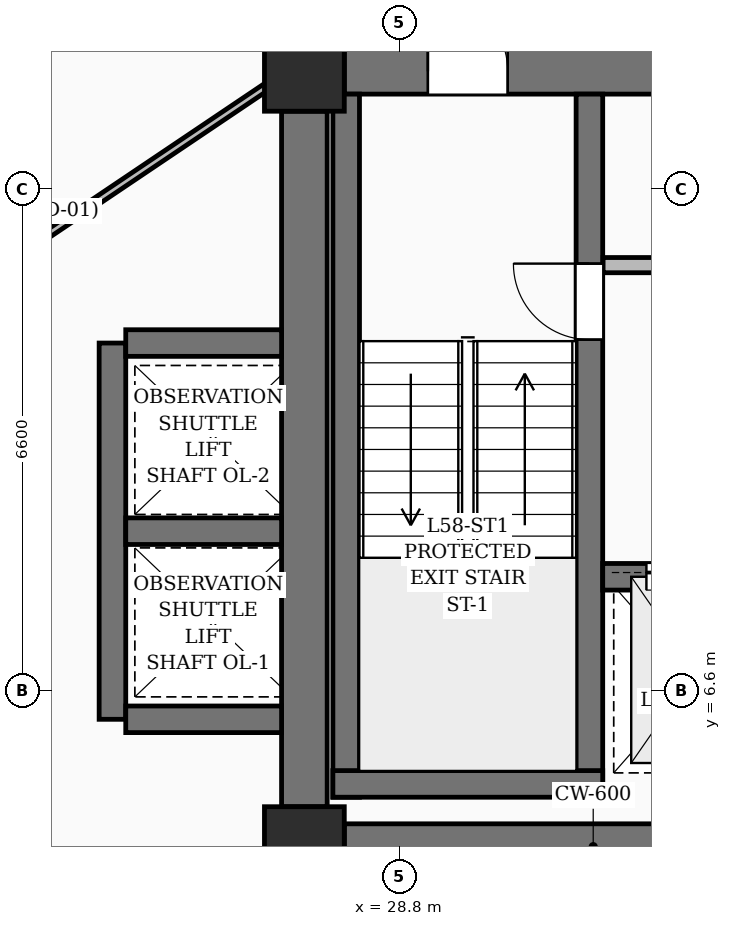
"""IFC4 building model, lengths in metres.
Left out: names, types, materials, properties, quantities, classifications, styles, units other than length and angle.
Written with IfcOpenShell. Run it as: python <this file> out.ifc"""

import sys

from ifc_helpers import new_model, si_unit, direction, frame, frame_2d, origin, origin_2d, place, context, subcontext, project, spatial, rectangle, extrude, element, fill, save


model = new_model("IFC4")
c1 = context("Model", 3, precision=1e-05, world=origin(), true_north=direction((0.0, 1.0)))
c2 = subcontext(c1, "Body", "Model", "MODEL_VIEW")
j1 = project(units=[si_unit("LENGTHUNIT", "METRE"), si_unit("PLANEANGLEUNIT", "RADIAN")], contexts=[c1])
p1 = place(None, origin())
s1 = spatial("IfcSite", under=j1, at=p1, CompositionType="ELEMENT")
p2 = place(p1, origin())
s2 = spatial("IfcBuilding", under=s1, at=p2, CompositionType="ELEMENT")
p3 = place(p2, frame((0.0, 0.0, 225.75)))
s3 = spatial("IfcBuildingStorey", under=s2, at=p3, CompositionType="ELEMENT", Elevation=225.75)
for number, where, z_axis, x_axis in (
    (1, (27.55, 4.55, 0.0), (0.0, 0.0, 1.0), (1.0, 0.0, 0.0)),
    (2, (27.55, 14.75, 0.0), (0.0, 0.0, 1.0), (1.0, 0.0, 0.0)),
):
    element("IfcColumn", number, at=place(p3, frame(where, z_axis=z_axis, x_axis=x_axis)), inside=s3, PredefinedType="COLUMN", context=c2, shape_type="SweptSolid", body=[
        extrude(rectangle(XDim=1.05, YDim=1.05, at=origin_2d()), origin(), (0.0, 0.0, 1.0), 3.75),
    ])
p4 = place(p3, frame((28.075, 4.55, 0.0), z_axis=(0.0, 0.0, 1.0), x_axis=(1.0, 0.0, 0.0)))
e3 = element("IfcWall", 3, at=p4, inside=s3, PredefinedType="SHEAR", context=c2, shape_type="SweptSolid", body=[
    extrude(rectangle(XDim=6.55, YDim=0.6, at=frame_2d((3.275, 0.0))), origin(), (0.0, 0.0, 1.0), 3.75),
])
p5 = place(p3, frame((28.075, 14.75, 0.0), z_axis=(0.0, 0.0, 1.0), x_axis=(1.0, 0.0, 0.0)))
e4 = element("IfcWall", 4, at=p5, inside=s3, PredefinedType="SHEAR", context=c2, shape_type="SweptSolid", body=[
    extrude(rectangle(XDim=6.55, YDim=0.6, at=frame_2d((3.275, 0.0))), origin(), (0.0, 0.0, 1.0), 3.75),
])
p6 = place(p5, frame((1.1, 0.0, 0.0)))
e5 = element("IfcOpeningElement", 5, at=p6, cuts=e4, PredefinedType="OPENING", context=c2, shape_type="SweptSolid", body=[
    extrude(rectangle(XDim=1.05, YDim=2.15, at=frame_2d((0.525, 1.075))), frame((0.0, 0.31, 0.0), z_axis=(0.0, -1.0, 0.0), x_axis=(1.0, 0.0, 0.0)), (0.0, 0.0, 1.0), 0.62),
])
p7 = place(p5, frame((4.95, 0.0, 0.0)))
e6 = element("IfcOpeningElement", 6, at=p7, cuts=e4, PredefinedType="OPENING", context=c2, shape_type="SweptSolid", body=[
    extrude(rectangle(XDim=0.95, YDim=2.15, at=frame_2d((0.475, 1.075))), frame((0.0, 0.31, 0.0), z_axis=(0.0, -1.0, 0.0), x_axis=(1.0, 0.0, 0.0)), (0.0, 0.0, 1.0), 0.62),
])
p8 = place(p3, frame((27.55, 5.075, 0.0), z_axis=(0.0, 0.0, 1.0), x_axis=(0.0, 1.0, 0.0)))
e7 = element("IfcWall", 7, at=p8, inside=s3, PredefinedType="SHEAR", context=c2, shape_type="SweptSolid", body=[
    extrude(rectangle(XDim=9.15, YDim=0.6, at=frame_2d((4.575, 0.0))), origin(), (0.0, 0.0, 1.0), 3.75),
])
p9 = place(p3, frame((28.1, 5.2, 0.0), z_axis=(0.0, 0.0, 1.0), x_axis=(0.0, 1.0, 0.0)))
e8 = element("IfcWall", 8, at=p9, inside=s3, PredefinedType="SOLIDWALL", context=c2, shape_type="SweptSolid", body=[
    extrude(rectangle(XDim=9.25, YDim=0.35, at=frame_2d((4.625, 0.0))), origin(), (0.0, 0.0, 1.0), 3.75),
])
p10 = place(p3, frame((31.3, 5.2, 0.0), z_axis=(0.0, 0.0, 1.0), x_axis=(0.0, 1.0, 0.0)))
e9 = element("IfcWall", 9, at=p10, inside=s3, PredefinedType="SOLIDWALL", context=c2, shape_type="SweptSolid", body=[
    extrude(rectangle(XDim=9.25, YDim=0.35, at=frame_2d((4.625, 0.0))), origin(), (0.0, 0.0, 1.0), 3.75),
])
p11 = place(p10, frame((6.02, 0.0, 0.0)))
e10 = element("IfcOpeningElement", 10, at=p11, cuts=e9, PredefinedType="OPENING", context=c2, shape_type="SweptSolid", body=[
    extrude(rectangle(XDim=1.0, YDim=2.15, at=frame_2d((0.5, 1.075))), frame((0.0, 0.185, 0.0), z_axis=(0.0, -1.0, 0.0), x_axis=(1.0, 0.0, 0.0)), (0.0, 0.0, 1.0), 0.37),
])
p12 = place(p3, frame((27.925, 5.375, 0.0), z_axis=(0.0, 0.0, 1.0), x_axis=(1.0, 0.0, 0.0)))
e11 = element("IfcWall", 11, at=p12, inside=s3, PredefinedType="SOLIDWALL", context=c2, shape_type="SweptSolid", body=[
    extrude(rectangle(XDim=3.55, YDim=0.35, at=frame_2d((1.775, 0.0))), origin(), (0.0, 0.0, 1.0), 3.75),
])
p13 = place(p3, frame((31.475, 8.1, 0.0), z_axis=(0.0, 0.0, 1.0), x_axis=(1.0, 0.0, 0.0)))
e12 = element("IfcWall", 12, at=p13, inside=s3, PredefinedType="SOLIDWALL", context=c2, shape_type="SweptSolid", body=[
    extrude(rectangle(XDim=2.575, YDim=0.35, at=frame_2d((1.288, 0.0))), origin(), (0.0, 0.0, 1.0), 3.75),
])
p14 = place(p13, frame((0.575, 0.0, 0.0)))
e13 = element("IfcOpeningElement", 13, at=p14, cuts=e12, PredefinedType="OPENING", context=c2, shape_type="SweptSolid", body=[
    extrude(rectangle(XDim=1.3, YDim=2.25, at=frame_2d((0.65, 1.125))), frame((0.0, 0.185, 0.0), z_axis=(0.0, -1.0, 0.0), x_axis=(1.0, 0.0, 0.0)), (0.0, 0.0, 1.0), 0.37),
])
p15 = place(p3, frame((25.025, 6.225, 0.0), z_axis=(0.0, 0.0, 1.0), x_axis=(0.0, 1.0, 0.0)))
e14 = element("IfcWall", 14, at=p15, inside=s3, PredefinedType="SOLIDWALL", context=c2, shape_type="SweptSolid", body=[
    extrude(rectangle(XDim=4.95, YDim=0.35, at=frame_2d((2.475, 0.0))), origin(), (0.0, 0.0, 1.0), 3.75),
])
for number, where, z_axis, x_axis in (
    (15, (25.2, 6.225, 0.0), (0.0, 0.0, 1.0), (1.0, 0.0, 0.0)),
    (16, (25.2, 8.7, 0.0), (0.0, 0.0, 1.0), (1.0, 0.0, 0.0)),
    (17, (25.2, 11.175, 0.0), (0.0, 0.0, 1.0), (1.0, 0.0, 0.0)),
):
    element("IfcWall", number, at=place(p3, frame(where, z_axis=z_axis, x_axis=x_axis)), inside=s3, PredefinedType="SOLIDWALL", context=c2, shape_type="SweptSolid", body=[
        extrude(rectangle(XDim=2.05, YDim=0.35, at=frame_2d((1.025, 0.0))), origin(), (0.0, 0.0, 1.0), 3.75),
    ])
p16 = place(p3, frame((31.48, 12.2, 0.0), z_axis=(0.0, 0.0, 1.0), x_axis=(1.0, 0.0, 0.0)))
e18 = element("IfcWall", 18, at=p16, inside=s3, PredefinedType="PARTITIONING", context=c2, shape_type="SweptSolid", body=[
    extrude(rectangle(XDim=4.04, YDim=0.2, at=frame_2d((2.02, 0.0))), origin(), (0.0, 0.0, 1.0), 3.5),
])
p17 = place(p16, frame((1.545, 0.0, 0.0)))
e19 = element("IfcOpeningElement", 19, at=p17, cuts=e18, PredefinedType="OPENING", context=c2, shape_type="SweptSolid", body=[
    extrude(rectangle(XDim=0.95, YDim=2.15, at=frame_2d((0.475, 1.075))), frame((0.0, 0.11, 0.0), z_axis=(0.0, -1.0, 0.0), x_axis=(1.0, 0.0, 0.0)), (0.0, 0.0, 1.0), 0.22),
])
p18 = place(p3, frame((27.25, 14.68, 0.0), z_axis=(0.0, 0.0, 1.0), x_axis=(-0.829673814963, -0.558248475828, 0.0)))
e20 = element("IfcWall", 20, at=p18, inside=s3, PredefinedType="PARTITIONING", context=c2, shape_type="SweptSolid", body=[
    extrude(rectangle(XDim=10.132, YDim=0.1, at=frame_2d((5.066, 0.0))), origin(), (0.0, 0.0, 1.0), 2.82),
])
p19 = place(p18, frame((4.771, 0.0, 0.0)))
e21 = element("IfcOpeningElement", 21, at=p19, cuts=e20, PredefinedType="OPENING", context=c2, shape_type="SweptSolid", body=[
    extrude(rectangle(XDim=0.95, YDim=2.2, at=frame_2d((0.475, 1.1))), frame((0.0, 0.06, 0.0), z_axis=(0.0, -1.0, 0.0), x_axis=(1.0, 0.0, 0.0)), (0.0, 0.0, 1.0), 0.12),
])
p20 = place(p6, origin())
e22 = element("IfcDoor", 22, at=p20, inside=s3, OperationType="SINGLE_SWING_LEFT", PredefinedType="DOOR", context=c2, shape_type="SweptSolid", body=[
    extrude(rectangle(XDim=1.05, YDim=2.15, at=frame_2d((0.525, 1.075))), frame((0.0, 0.025, 0.0), z_axis=(0.0, -1.0, 0.0), x_axis=(1.0, 0.0, 0.0)), (0.0, 0.0, 1.0), 0.05),
])
fill(e5, e22)
p21 = place(p11, origin())
e23 = element("IfcDoor", 23, at=p21, inside=s3, OperationType="SINGLE_SWING_RIGHT", PredefinedType="DOOR", context=c2, shape_type="SweptSolid", body=[
    extrude(rectangle(XDim=1.0, YDim=2.15, at=frame_2d((0.5, 1.075))), frame((0.0, 0.025, 0.0), z_axis=(0.0, -1.0, 0.0), x_axis=(1.0, 0.0, 0.0)), (0.0, 0.0, 1.0), 0.05),
])
fill(e10, e23)
p22 = place(p14, origin())
e24 = element("IfcDoor", 24, at=p22, inside=s3, OperationType="DOUBLE_DOOR_SLIDING", PredefinedType="DOOR", context=c2, shape_type="SweptSolid", body=[
    extrude(rectangle(XDim=1.3, YDim=2.25, at=frame_2d((0.65, 1.125))), frame((0.0, 0.025, 0.0), z_axis=(0.0, -1.0, 0.0), x_axis=(1.0, 0.0, 0.0)), (0.0, 0.0, 1.0), 0.05),
])
fill(e13, e24)
save(model, sys.argv[1])
